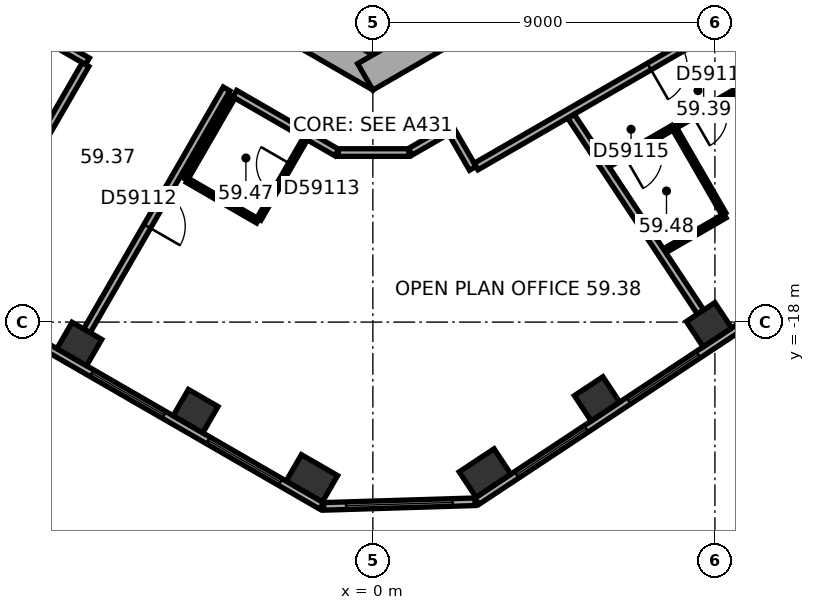
"""IFC4 building model, lengths in metres.
Left out: names, types, materials, properties, quantities, classifications, styles, units other than length and angle.
Written with IfcOpenShell. Run it as: python <this file> out.ifc"""

import sys

from ifc_helpers import new_model, si_unit, direction, frame, frame_2d, origin, origin_2d, place, context, subcontext, project, spatial, rectangle, extrude, element, fill, save


model = new_model("IFC4")
c1 = context("Model", 3, precision=1e-05, world=origin(), true_north=direction((0.0, 1.0)))
c2 = subcontext(c1, "Body", "Model", "MODEL_VIEW")
j1 = project(units=[si_unit("LENGTHUNIT", "METRE"), si_unit("PLANEANGLEUNIT", "RADIAN")], contexts=[c1])
p1 = place(None, origin())
s1 = spatial("IfcSite", under=j1, at=p1, CompositionType="ELEMENT")
p2 = place(p1, origin())
s2 = spatial("IfcBuilding", under=s1, at=p2, CompositionType="ELEMENT")
p3 = place(p2, frame((0.0, 0.0, 240.2)))
s3 = spatial("IfcBuildingStorey", under=s2, at=p3, CompositionType="ELEMENT", Elevation=240.2)
for number, where, z_axis, x_axis in (
    (1, (-7.725, -18.576, 0.0), (0.0, 0.0, 1.0), (0.866, -0.5, 0.0)),
    (2, (-4.665, -20.343, 0.0), (0.0, 0.0, 1.0), (0.866, -0.5, 0.0)),
):
    element("IfcColumn", number, at=place(p3, frame(where, z_axis=z_axis, x_axis=x_axis)), inside=s3, PredefinedType="COLUMN", context=c2, shape_type="SweptSolid", body=[
        extrude(rectangle(XDim=0.9, YDim=0.8, at=origin_2d()), origin(), (0.0, 0.0, 1.0), 3.7),
    ])
for number, where, z_axis, x_axis in (
    (3, (-1.604, -22.11, 0.0), (0.0, 0.0, 1.0), (0.866, -0.5, 0.0)),
    (4, (2.951, -21.971, 0.0), (0.0, 0.0, 1.0), (0.834, 0.552, 0.0)),
):
    element("IfcColumn", number, at=place(p3, frame(where, z_axis=z_axis, x_axis=x_axis)), inside=s3, PredefinedType="COLUMN", context=c2, shape_type="SweptSolid", body=[
        extrude(rectangle(XDim=1.1, YDim=0.8, at=origin_2d()), origin(), (0.0, 0.0, 1.0), 3.7),
    ])
for number, where, z_axis, x_axis in (
    (5, (5.898, -20.021, 0.0), (0.0, 0.0, 1.0), (0.834, 0.552, 0.0)),
    (6, (8.844, -18.07, 0.0), (0.0, 0.0, 1.0), (0.834, 0.552, 0.0)),
):
    element("IfcColumn", number, at=place(p3, frame(where, z_axis=z_axis, x_axis=x_axis)), inside=s3, PredefinedType="COLUMN", context=c2, shape_type="SweptSolid", body=[
        extrude(rectangle(XDim=0.9, YDim=0.8, at=origin_2d()), origin(), (0.0, 0.0, 1.0), 3.7),
    ])
p4 = place(p3, frame((-10.1, -5.6, 0.0), z_axis=(0.0, 0.0, 1.0), x_axis=(0.866023897231, -0.500002609418, 0.0)))
e7 = element("IfcWall", 7, at=p4, inside=s3, PredefinedType="SHEAR", context=c2, shape_type="SweptSolid", body=[
    extrude(rectangle(XDim=11.894, YDim=0.8, at=frame_2d((5.947, 0.0))), origin(), (0.0, 0.0, 1.0), 3.7),
])
p5 = place(p4, frame((6.147, 0.0, 0.0)))
e8 = element("IfcOpeningElement", 8, at=p5, cuts=e7, PredefinedType="OPENING", context=c2, shape_type="SweptSolid", body=[
    extrude(rectangle(XDim=1.5, YDim=2.1, at=frame_2d((0.75, 1.05))), frame((0.0, 0.41, 0.0), z_axis=(0.0, -1.0, 0.0), x_axis=(1.0, 0.0, 0.0)), (0.0, 0.0, 1.0), 0.82),
])
p6 = place(p4, frame((1.597, 0.0, 0.0)))
e9 = element("IfcOpeningElement", 9, at=p6, cuts=e7, PredefinedType="OPENING", context=c2, shape_type="SweptSolid", body=[
    extrude(rectangle(XDim=1.1, YDim=2.1, at=frame_2d((0.55, 1.05))), frame((0.0, 0.41, 0.0), z_axis=(0.0, -1.0, 0.0), x_axis=(1.0, 0.0, 0.0)), (0.0, 0.0, 1.0), 0.82),
])
p7 = place(p4, frame((4.197, 0.0, 0.0)))
e10 = element("IfcOpeningElement", 10, at=p7, cuts=e7, PredefinedType="OPENING", context=c2, shape_type="SweptSolid", body=[
    extrude(rectangle(XDim=1.1, YDim=2.1, at=frame_2d((0.55, 1.05))), frame((0.0, 0.41, 0.0), z_axis=(0.0, -1.0, 0.0), x_axis=(1.0, 0.0, 0.0)), (0.0, 0.0, 1.0), 0.82),
])
p8 = place(p3, frame((-0.2, -11.547, 0.0), z_axis=(0.0, 0.0, 1.0), x_axis=(0.866023897231, 0.500002609418, 0.0)))
e11 = element("IfcWall", 11, at=p8, inside=s3, PredefinedType="SHEAR", context=c2, shape_type="SweptSolid", body=[
    extrude(rectangle(XDim=11.894, YDim=0.8, at=frame_2d((5.947, 0.0))), origin(), (0.0, 0.0, 1.0), 3.7),
])
p9 = place(p8, frame((2.497, 0.0, 0.0)))
e12 = element("IfcOpeningElement", 12, at=p9, cuts=e11, PredefinedType="OPENING", context=c2, shape_type="SweptSolid", body=[
    extrude(rectangle(XDim=1.1, YDim=2.1, at=frame_2d((0.55, 1.05))), frame((0.0, 0.41, 0.0), z_axis=(0.0, -1.0, 0.0), x_axis=(1.0, 0.0, 0.0)), (0.0, 0.0, 1.0), 0.82),
])
p10 = place(p8, frame((5.097, 0.0, 0.0)))
e13 = element("IfcOpeningElement", 13, at=p10, cuts=e11, PredefinedType="OPENING", context=c2, shape_type="SweptSolid", body=[
    extrude(rectangle(XDim=1.1, YDim=2.1, at=frame_2d((0.55, 1.05))), frame((0.0, 0.41, 0.0), z_axis=(0.0, -1.0, 0.0), x_axis=(1.0, 0.0, 0.0)), (0.0, 0.0, 1.0), 0.82),
])
p11 = place(p8, frame((7.697, 0.0, 0.0)))
e14 = element("IfcOpeningElement", 14, at=p11, cuts=e11, PredefinedType="OPENING", context=c2, shape_type="SweptSolid", body=[
    extrude(rectangle(XDim=1.1, YDim=2.1, at=frame_2d((0.55, 1.05))), frame((0.0, 0.41, 0.0), z_axis=(0.0, -1.0, 0.0), x_axis=(1.0, 0.0, 0.0)), (0.0, 0.0, 1.0), 0.82),
])
p12 = place(p3, frame((-17.664, -13.415, 0.0), z_axis=(0.0, 0.0, 1.0), x_axis=(0.866026555358, -0.49999800541, 0.0)))
e15 = element("IfcWall", 15, at=p12, inside=s3, PredefinedType="STANDARD", context=c2, shape_type="SweptSolid", body=[
    extrude(rectangle(XDim=18.841, YDim=0.2, at=frame_2d((9.421, 0.0))), origin(), (0.0, 0.0, 1.0), 3.7),
])
p13 = place(p12, frame((1.254, 0.0, 0.9)))
e16 = element("IfcOpeningElement", 16, at=p13, cuts=e15, PredefinedType="OPENING", context=c2, shape_type="SweptSolid", body=[
    extrude(rectangle(XDim=2.2, YDim=2.0, at=frame_2d((1.1, 1.0))), frame((0.0, 0.11, 0.0), z_axis=(0.0, -1.0, 0.0), x_axis=(1.0, 0.0, 0.0)), (0.0, 0.0, 1.0), 0.22),
])
p14 = place(p12, frame((4.788, 0.0, 0.9)))
e17 = element("IfcOpeningElement", 17, at=p14, cuts=e15, PredefinedType="OPENING", context=c2, shape_type="SweptSolid", body=[
    extrude(rectangle(XDim=2.2, YDim=2.0, at=frame_2d((1.1, 1.0))), frame((0.0, 0.11, 0.0), z_axis=(0.0, -1.0, 0.0), x_axis=(1.0, 0.0, 0.0)), (0.0, 0.0, 1.0), 0.22),
])
p15 = place(p12, frame((8.322, 0.0, 0.9)))
e18 = element("IfcOpeningElement", 18, at=p15, cuts=e15, PredefinedType="OPENING", context=c2, shape_type="SweptSolid", body=[
    extrude(rectangle(XDim=2.2, YDim=2.0, at=frame_2d((1.1, 1.0))), frame((0.0, 0.11, 0.0), z_axis=(0.0, -1.0, 0.0), x_axis=(1.0, 0.0, 0.0)), (0.0, 0.0, 1.0), 0.22),
])
p16 = place(p12, frame((11.855, 0.0, 0.9)))
e19 = element("IfcOpeningElement", 19, at=p16, cuts=e15, PredefinedType="OPENING", context=c2, shape_type="SweptSolid", body=[
    extrude(rectangle(XDim=2.2, YDim=2.0, at=frame_2d((1.1, 1.0))), frame((0.0, 0.11, 0.0), z_axis=(0.0, -1.0, 0.0), x_axis=(1.0, 0.0, 0.0)), (0.0, 0.0, 1.0), 0.22),
])
p17 = place(p12, frame((15.389, 0.0, 0.9)))
e20 = element("IfcOpeningElement", 20, at=p17, cuts=e15, PredefinedType="OPENING", context=c2, shape_type="SweptSolid", body=[
    extrude(rectangle(XDim=2.2, YDim=2.0, at=frame_2d((1.1, 1.0))), frame((0.0, 0.11, 0.0), z_axis=(0.0, -1.0, 0.0), x_axis=(1.0, 0.0, 0.0)), (0.0, 0.0, 1.0), 0.22),
])
p18 = place(p3, frame((-1.294, -22.849, 0.0), z_axis=(0.0, 0.0, 1.0), x_axis=(0.999533952558, 0.030526671678, 0.0)))
e21 = element("IfcWall", 21, at=p18, inside=s3, PredefinedType="STANDARD", context=c2, shape_type="SweptSolid", body=[
    extrude(rectangle(XDim=3.983, YDim=0.2, at=frame_2d((1.991, 0.0))), origin(), (0.0, 0.0, 1.0), 3.7),
])
p19 = place(p18, frame((0.591, 0.0, 0.9)))
e22 = element("IfcOpeningElement", 22, at=p19, cuts=e21, PredefinedType="OPENING", context=c2, shape_type="SweptSolid", body=[
    extrude(rectangle(XDim=2.8, YDim=2.0, at=frame_2d((1.4, 1.0))), frame((0.0, 0.11, 0.0), z_axis=(0.0, -1.0, 0.0), x_axis=(1.0, 0.0, 0.0)), (0.0, 0.0, 1.0), 0.22),
])
p20 = place(p3, frame((2.739, -22.711, 0.0), z_axis=(0.0, 0.0, 1.0), x_axis=(0.833885723098, 0.551937134838, 0.0)))
e23 = element("IfcWall", 23, at=p20, inside=s3, PredefinedType="STANDARD", context=c2, shape_type="SweptSolid", body=[
    extrude(rectangle(XDim=18.841, YDim=0.2, at=frame_2d((9.421, 0.0))), origin(), (0.0, 0.0, 1.0), 3.7),
])
p21 = place(p20, frame((1.252, 0.0, 0.9)))
e24 = element("IfcOpeningElement", 24, at=p21, cuts=e23, PredefinedType="OPENING", context=c2, shape_type="SweptSolid", body=[
    extrude(rectangle(XDim=2.2, YDim=2.0, at=frame_2d((1.1, 1.0))), frame((0.0, 0.11, 0.0), z_axis=(0.0, -1.0, 0.0), x_axis=(1.0, 0.0, 0.0)), (0.0, 0.0, 1.0), 0.22),
])
p22 = place(p20, frame((4.786, 0.0, 0.9)))
e25 = element("IfcOpeningElement", 25, at=p22, cuts=e23, PredefinedType="OPENING", context=c2, shape_type="SweptSolid", body=[
    extrude(rectangle(XDim=2.2, YDim=2.0, at=frame_2d((1.1, 1.0))), frame((0.0, 0.11, 0.0), z_axis=(0.0, -1.0, 0.0), x_axis=(1.0, 0.0, 0.0)), (0.0, 0.0, 1.0), 0.22),
])
p23 = place(p20, frame((8.32, 0.0, 0.9)))
e26 = element("IfcOpeningElement", 26, at=p23, cuts=e23, PredefinedType="OPENING", context=c2, shape_type="SweptSolid", body=[
    extrude(rectangle(XDim=2.2, YDim=2.0, at=frame_2d((1.1, 1.0))), frame((0.0, 0.11, 0.0), z_axis=(0.0, -1.0, 0.0), x_axis=(1.0, 0.0, 0.0)), (0.0, 0.0, 1.0), 0.22),
])
p24 = place(p20, frame((11.854, 0.0, 0.9)))
e27 = element("IfcOpeningElement", 27, at=p24, cuts=e23, PredefinedType="OPENING", context=c2, shape_type="SweptSolid", body=[
    extrude(rectangle(XDim=2.2, YDim=2.0, at=frame_2d((1.1, 1.0))), frame((0.0, 0.11, 0.0), z_axis=(0.0, -1.0, 0.0), x_axis=(1.0, 0.0, 0.0)), (0.0, 0.0, 1.0), 0.22),
])
p25 = place(p20, frame((15.387, 0.0, 0.9)))
e28 = element("IfcOpeningElement", 28, at=p25, cuts=e23, PredefinedType="OPENING", context=c2, shape_type="SweptSolid", body=[
    extrude(rectangle(XDim=2.2, YDim=2.0, at=frame_2d((1.1, 1.0))), frame((0.0, 0.11, 0.0), z_axis=(0.0, -1.0, 0.0), x_axis=(1.0, 0.0, 0.0)), (0.0, 0.0, 1.0), 0.22),
])
p26 = place(p3, frame((-11.551, -8.805, 0.0), z_axis=(0.0, 0.0, 1.0), x_axis=(0.866038310922, -0.499977643516, 0.0)))
e29 = element("IfcWall", 29, at=p26, inside=s3, PredefinedType="PARTITIONING", context=c2, shape_type="SweptSolid", body=[
    extrude(rectangle(XDim=4.665, YDim=0.2, at=frame_2d((2.333, 0.0))), origin(), (0.0, 0.0, 1.0), 3.42),
])
p27 = place(p3, frame((-10.585, -16.463, 0.0), z_axis=(0.0, 0.0, 1.0), x_axis=(0.499993802756, 0.866028981735, 0.0)))
e30 = element("IfcWall", 30, at=p27, inside=s3, PredefinedType="PARTITIONING", context=c2, shape_type="SweptSolid", body=[
    extrude(rectangle(XDim=6.049, YDim=0.2, at=frame_2d((3.024, 0.0))), origin(), (0.0, 0.0, 1.0), 2.87),
])
p28 = place(p27, frame((2.524, 0.0, 0.0)))
e31 = element("IfcOpeningElement", 31, at=p28, cuts=e30, PredefinedType="OPENING", context=c2, shape_type="SweptSolid", body=[
    extrude(rectangle(XDim=1.0, YDim=2.1, at=frame_2d((0.5, 1.05))), frame((0.0, 0.11, 0.0), z_axis=(0.0, -1.0, 0.0), x_axis=(1.0, 0.0, 0.0)), (0.0, 0.0, 1.0), 0.22),
])
p29 = place(p3, frame((-7.525, -18.23, 0.0), z_axis=(0.0, 0.0, 1.0), x_axis=(0.499983153418, 0.866035129944, 0.0)))
e32 = element("IfcWall", 32, at=p29, inside=s3, PredefinedType="PARTITIONING", context=c2, shape_type="SweptSolid", body=[
    extrude(rectangle(XDim=7.35, YDim=0.2, at=frame_2d((3.675, 0.0))), origin(), (0.0, 0.0, 1.0), 3.42),
])
p30 = place(p29, frame((3.175, 0.0, 0.0)))
e33 = element("IfcOpeningElement", 33, at=p30, cuts=e32, PredefinedType="OPENING", context=c2, shape_type="SweptSolid", body=[
    extrude(rectangle(XDim=1.0, YDim=2.1, at=frame_2d((0.5, 1.05))), frame((0.0, 0.11, 0.0), z_axis=(0.0, -1.0, 0.0), x_axis=(1.0, 0.0, 0.0)), (0.0, 0.0, 1.0), 0.22),
])
p31 = place(p3, frame((-4.934, -14.241, 0.0), z_axis=(0.0, 0.0, 1.0), x_axis=(0.500004234368, 0.866022959057, 0.0)))
e34 = element("IfcWall", 34, at=p31, inside=s3, PredefinedType="PARTITIONING", context=c2, shape_type="SweptSolid", body=[
    extrude(rectangle(XDim=2.5, YDim=0.12, at=frame_2d((1.25, 0.0))), origin(), (0.0, 0.0, 1.0), 3.42),
])
p32 = place(p3, frame((-3.634, -11.99, 0.0), z_axis=(0.0, 0.0, 1.0), x_axis=(0.866033392248, -0.499986163319, 0.0)))
e35 = element("IfcWall", 35, at=p32, inside=s3, PredefinedType="PARTITIONING", context=c2, shape_type="SweptSolid", body=[
    extrude(rectangle(XDim=3.099, YDim=0.2, at=frame_2d((1.549, 0.0))), origin(), (0.0, 0.0, 1.0), 3.42),
])
p33 = place(p3, frame((-3.028, -15.341, 0.0), z_axis=(0.0, 0.0, 1.0), x_axis=(-0.86600889856, 0.500028586798, 0.0)))
e36 = element("IfcWall", 36, at=p33, inside=s3, PredefinedType="PARTITIONING", context=c2, shape_type="SweptSolid", body=[
    extrude(rectangle(XDim=2.14, YDim=0.12, at=frame_2d((1.07, 0.0))), origin(), (0.0, 0.0, 1.0), 3.42),
])
p34 = place(p3, frame((-1.778, -13.176, 0.0), z_axis=(0.0, 0.0, 1.0), x_axis=(-0.500002508028, -0.866023955769, 0.0)))
e37 = element("IfcWall", 37, at=p34, inside=s3, PredefinedType="PARTITIONING", context=c2, shape_type="SweptSolid", body=[
    extrude(rectangle(XDim=2.44, YDim=0.12, at=frame_2d((1.22, 0.0))), origin(), (0.0, 0.0, 1.0), 3.42),
])
p35 = place(p34, frame((0.77, 0.0, 0.0)))
e38 = element("IfcOpeningElement", 38, at=p35, cuts=e37, PredefinedType="OPENING", context=c2, shape_type="SweptSolid", body=[
    extrude(rectangle(XDim=0.9, YDim=2.1, at=frame_2d((0.45, 1.05))), frame((0.0, 0.07, 0.0), z_axis=(0.0, -1.0, 0.0), x_axis=(1.0, 0.0, 0.0)), (0.0, 0.0, 1.0), 0.14),
])
p36 = place(p3, frame((-0.91, -13.539, 0.0), z_axis=(0.0, 0.0, 1.0), x_axis=(1.0, 0.0, 0.0)))
e39 = element("IfcWall", 39, at=p36, inside=s3, PredefinedType="PARTITIONING", context=c2, shape_type="SweptSolid", body=[
    extrude(rectangle(XDim=1.86, YDim=0.2, at=frame_2d((0.93, 0.0))), origin(), (0.0, 0.0, 1.0), 3.42),
])
p37 = place(p3, frame((0.985, -13.519, 0.0), z_axis=(0.0, 0.0, 1.0), x_axis=(0.866054082991, 0.499950322867, 0.0)))
e40 = element("IfcWall", 40, at=p37, inside=s3, PredefinedType="PARTITIONING", context=c2, shape_type="SweptSolid", body=[
    extrude(rectangle(XDim=1.206, YDim=0.2, at=frame_2d((0.603, 0.0))), origin(), (0.0, 0.0, 1.0), 3.42),
])
p38 = place(p3, frame((2.079, -13.003, 0.0), z_axis=(0.0, 0.0, 1.0), x_axis=(0.500074377092, -0.865982457891, 0.0)))
e41 = element("IfcWall", 41, at=p38, inside=s3, PredefinedType="PARTITIONING", context=c2, shape_type="SweptSolid", body=[
    extrude(rectangle(XDim=1.101, YDim=0.2, at=frame_2d((0.55, 0.0))), origin(), (0.0, 0.0, 1.0), 3.42),
])
p39 = place(p3, frame((2.716, -13.906, 0.0), z_axis=(0.0, 0.0, 1.0), x_axis=(0.866040290674, 0.499974214264, 0.0)))
e42 = element("IfcWall", 42, at=p39, inside=s3, PredefinedType="PARTITIONING", context=c2, shape_type="SweptSolid", body=[
    extrude(rectangle(XDim=8.702, YDim=0.2, at=frame_2d((4.351, 0.0))), origin(), (0.0, 0.0, 1.0), 3.42),
])
p40 = place(p39, frame((5.26, 0.0, 0.0)))
e43 = element("IfcOpeningElement", 43, at=p40, cuts=e42, PredefinedType="OPENING", context=c2, shape_type="SweptSolid", body=[
    extrude(rectangle(XDim=1.0, YDim=2.1, at=frame_2d((0.5, 1.05))), frame((0.0, 0.11, 0.0), z_axis=(0.0, -1.0, 0.0), x_axis=(1.0, 0.0, 0.0)), (0.0, 0.0, 1.0), 0.22),
])
p41 = place(p3, frame((6.183, -13.867, 0.0), z_axis=(0.0, 0.0, 1.0), x_axis=(0.866031365477, 0.499989673903, 0.0)))
e44 = element("IfcWall", 44, at=p41, inside=s3, PredefinedType="PARTITIONING", context=c2, shape_type="SweptSolid", body=[
    extrude(rectangle(XDim=6.881, YDim=0.12, at=frame_2d((3.44, 0.0))), origin(), (0.0, 0.0, 1.0), 3.42),
])
p42 = place(p41, frame((0.5, 0.0, 0.0)))
e45 = element("IfcOpeningElement", 45, at=p42, cuts=e44, PredefinedType="OPENING", context=c2, shape_type="SweptSolid", body=[
    extrude(rectangle(XDim=1.0, YDim=2.1, at=frame_2d((0.5, 1.05))), frame((0.0, 0.07, 0.0), z_axis=(0.0, -1.0, 0.0), x_axis=(1.0, 0.0, 0.0)), (0.0, 0.0, 1.0), 0.14),
])
p43 = place(p41, frame((2.583, 0.0, 0.0)))
e46 = element("IfcOpeningElement", 46, at=p43, cuts=e44, PredefinedType="OPENING", context=c2, shape_type="SweptSolid", body=[
    extrude(rectangle(XDim=0.9, YDim=2.1, at=frame_2d((0.45, 1.05))), frame((0.0, 0.07, 0.0), z_axis=(0.0, -1.0, 0.0), x_axis=(1.0, 0.0, 0.0)), (0.0, 0.0, 1.0), 0.14),
])
p44 = place(p41, frame((5.023, 0.0, 0.0)))
e47 = element("IfcOpeningElement", 47, at=p44, cuts=e44, PredefinedType="OPENING", context=c2, shape_type="SweptSolid", body=[
    extrude(rectangle(XDim=0.9, YDim=2.1, at=frame_2d((0.45, 1.05))), frame((0.0, 0.07, 0.0), z_axis=(0.0, -1.0, 0.0), x_axis=(1.0, 0.0, 0.0)), (0.0, 0.0, 1.0), 0.14),
])
p45 = place(p3, frame((7.676, -16.123, 0.0), z_axis=(0.0, 0.0, 1.0), x_axis=(0.866023842607, 0.500002704028, 0.0)))
e48 = element("IfcWall", 48, at=p45, inside=s3, PredefinedType="PARTITIONING", context=c2, shape_type="SweptSolid", body=[
    extrude(rectangle(XDim=1.835, YDim=0.12, at=frame_2d((0.917, 0.0))), origin(), (0.0, 0.0, 1.0), 3.42),
])
p46 = place(p3, frame((8.624, -17.737, 0.0), z_axis=(0.0, 0.0, 1.0), x_axis=(-0.55193161762, 0.83388937484, 0.0)))
e49 = element("IfcWall", 49, at=p46, inside=s3, PredefinedType="PARTITIONING", context=c2, shape_type="SweptSolid", body=[
    extrude(rectangle(XDim=6.173, YDim=0.2, at=frame_2d((3.086, 0.0))), origin(), (0.0, 0.0, 1.0), 2.87),
])
p47 = place(p3, frame((9.235, -15.154, 0.0), z_axis=(0.0, 0.0, 1.0), x_axis=(-0.500006411147, 0.866021702275, 0.0)))
e50 = element("IfcWall", 50, at=p47, inside=s3, PredefinedType="PARTITIONING", context=c2, shape_type="SweptSolid", body=[
    extrude(rectangle(XDim=2.58, YDim=0.12, at=frame_2d((1.29, 0.0))), origin(), (0.0, 0.0, 1.0), 3.42),
])
p48 = place(p16, origin())
e51 = element("IfcWindow", 51, at=p48, inside=s3, PartitioningType="SINGLE_PANEL", PredefinedType="WINDOW", context=c2, shape_type="SweptSolid", body=[
    extrude(rectangle(XDim=2.2, YDim=2.0, at=frame_2d((1.1, 1.0))), frame((0.0, 0.03, 0.0), z_axis=(0.0, -1.0, 0.0), x_axis=(1.0, 0.0, 0.0)), (0.0, 0.0, 1.0), 0.06),
])
fill(e19, e51)
p49 = place(p17, origin())
e52 = element("IfcWindow", 52, at=p49, inside=s3, PartitioningType="SINGLE_PANEL", PredefinedType="WINDOW", context=c2, shape_type="SweptSolid", body=[
    extrude(rectangle(XDim=2.2, YDim=2.0, at=frame_2d((1.1, 1.0))), frame((0.0, 0.03, 0.0), z_axis=(0.0, -1.0, 0.0), x_axis=(1.0, 0.0, 0.0)), (0.0, 0.0, 1.0), 0.06),
])
fill(e20, e52)
p50 = place(p19, origin())
e53 = element("IfcWindow", 53, at=p50, inside=s3, PartitioningType="SINGLE_PANEL", PredefinedType="WINDOW", context=c2, shape_type="SweptSolid", body=[
    extrude(rectangle(XDim=2.8, YDim=2.0, at=frame_2d((1.4, 1.0))), frame((0.0, 0.03, 0.0), z_axis=(0.0, -1.0, 0.0), x_axis=(1.0, 0.0, 0.0)), (0.0, 0.0, 1.0), 0.06),
])
fill(e22, e53)
p51 = place(p21, origin())
e54 = element("IfcWindow", 54, at=p51, inside=s3, PartitioningType="SINGLE_PANEL", PredefinedType="WINDOW", context=c2, shape_type="SweptSolid", body=[
    extrude(rectangle(XDim=2.2, YDim=2.0, at=frame_2d((1.1, 1.0))), frame((0.0, 0.03, 0.0), z_axis=(0.0, -1.0, 0.0), x_axis=(1.0, 0.0, 0.0)), (0.0, 0.0, 1.0), 0.06),
])
fill(e24, e54)
p52 = place(p22, origin())
e55 = element("IfcWindow", 55, at=p52, inside=s3, PartitioningType="SINGLE_PANEL", PredefinedType="WINDOW", context=c2, shape_type="SweptSolid", body=[
    extrude(rectangle(XDim=2.2, YDim=2.0, at=frame_2d((1.1, 1.0))), frame((0.0, 0.03, 0.0), z_axis=(0.0, -1.0, 0.0), x_axis=(1.0, 0.0, 0.0)), (0.0, 0.0, 1.0), 0.06),
])
fill(e25, e55)
p53 = place(p30, origin())
e56 = element("IfcDoor", 56, at=p53, inside=s3, OperationType="SINGLE_SWING_LEFT", PredefinedType="DOOR", context=c2, shape_type="SweptSolid", body=[
    extrude(rectangle(XDim=1.0, YDim=2.1, at=frame_2d((0.5, 1.05))), frame((0.0, 0.025, 0.0), z_axis=(0.0, -1.0, 0.0), x_axis=(1.0, 0.0, 0.0)), (0.0, 0.0, 1.0), 0.05),
])
fill(e33, e56)
p54 = place(p35, origin())
e57 = element("IfcDoor", 57, at=p54, inside=s3, OperationType="SINGLE_SWING_LEFT", PredefinedType="DOOR", context=c2, shape_type="SweptSolid", body=[
    extrude(rectangle(XDim=0.9, YDim=2.1, at=frame_2d((0.45, 1.05))), frame((0.0, 0.025, 0.0), z_axis=(0.0, -1.0, 0.0), x_axis=(1.0, 0.0, 0.0)), (0.0, 0.0, 1.0), 0.05),
])
fill(e38, e57)
p55 = place(p40, origin())
e58 = element("IfcDoor", 58, at=p55, inside=s3, OperationType="SINGLE_SWING_LEFT", PredefinedType="DOOR", context=c2, shape_type="SweptSolid", body=[
    extrude(rectangle(XDim=1.0, YDim=2.1, at=frame_2d((0.5, 1.05))), frame((0.0, 0.025, 0.0), z_axis=(0.0, -1.0, 0.0), x_axis=(1.0, 0.0, 0.0)), (0.0, 0.0, 1.0), 0.05),
])
fill(e43, e58)
p56 = place(p42, origin())
e59 = element("IfcDoor", 59, at=p56, inside=s3, OperationType="SINGLE_SWING_LEFT", PredefinedType="DOOR", context=c2, shape_type="SweptSolid", body=[
    extrude(rectangle(XDim=1.0, YDim=2.1, at=frame_2d((0.5, 1.05))), frame((0.0, 0.025, 0.0), z_axis=(0.0, -1.0, 0.0), x_axis=(1.0, 0.0, 0.0)), (0.0, 0.0, 1.0), 0.05),
])
fill(e45, e59)
p57 = place(p43, origin())
e60 = element("IfcDoor", 60, at=p57, inside=s3, OperationType="SINGLE_SWING_LEFT", PredefinedType="DOOR", context=c2, shape_type="SweptSolid", body=[
    extrude(rectangle(XDim=0.9, YDim=2.1, at=frame_2d((0.45, 1.05))), frame((0.0, 0.025, 0.0), z_axis=(0.0, -1.0, 0.0), x_axis=(1.0, 0.0, 0.0)), (0.0, 0.0, 1.0), 0.05),
])
fill(e46, e60)
save(model, sys.argv[1])
